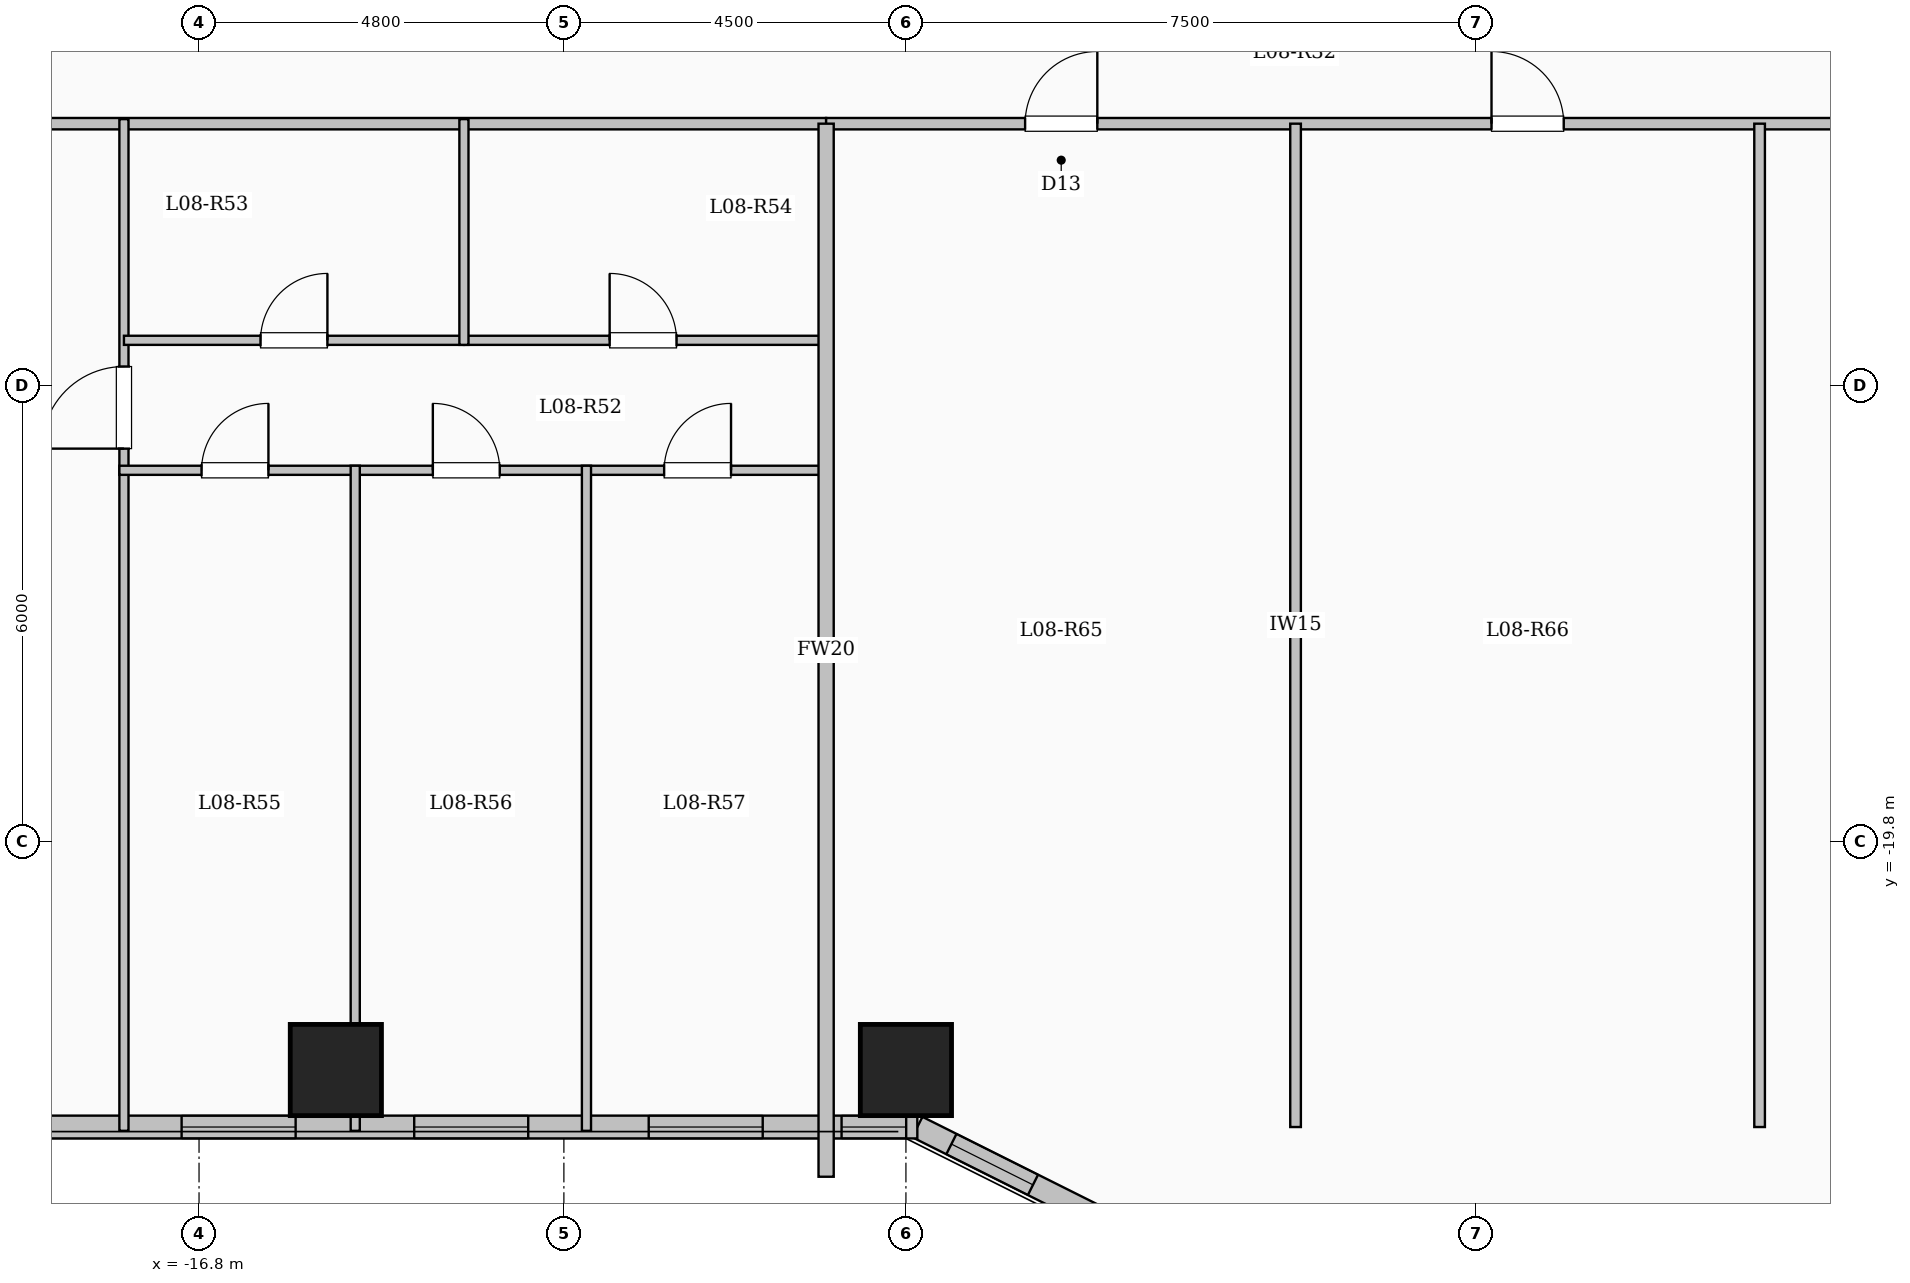
"""IFC4 building model, lengths in metres.
Left out: names, types, materials, properties, quantities, classifications, styles, units other than length and angle.
Written with IfcOpenShell. Run it as: python <this file> out.ifc"""

import sys

from ifc_helpers import new_model, si_unit, direction, frame, frame_2d, origin, origin_2d, place, context, subcontext, project, spatial, rectangle, extrude, element, fill, save


model = new_model("IFC4")
c1 = context("Model", 3, precision=1e-05, world=origin(), true_north=direction((0.0, 1.0)))
c2 = subcontext(c1, "Body", "Model", "MODEL_VIEW")
j1 = project(units=[si_unit("LENGTHUNIT", "METRE"), si_unit("PLANEANGLEUNIT", "RADIAN")], contexts=[c1])
p1 = place(None, origin())
s1 = spatial("IfcSite", under=j1, at=p1, CompositionType="ELEMENT")
p2 = place(p1, origin())
s2 = spatial("IfcBuilding", under=s1, at=p2, CompositionType="ELEMENT")
p3 = place(p2, frame((0.0, 0.0, 34.05)))
s3 = spatial("IfcBuildingStorey", under=s2, at=p3, CompositionType="ELEMENT", Elevation=34.05)
for number, where, z_axis, x_axis in (
    (1, (-15.0, -22.8, 0.0), (0.0, 0.0, 1.0), (1.0, 0.0, 0.0)),
    (2, (-7.5, -22.8, 0.0), (0.0, 0.0, 1.0), (1.0, 0.0, 0.0)),
):
    element("IfcColumn", number, at=place(p3, frame(where, z_axis=z_axis, x_axis=x_axis)), inside=s3, PredefinedType="COLUMN", context=c2, shape_type="SweptSolid", body=[
        extrude(rectangle(XDim=1.2, YDim=1.2, at=origin_2d()), origin(), (0.0, 0.0, 1.0), 3.35),
    ])
p4 = place(p3, frame((7.35, -23.55, 0.0), z_axis=(0.0, 0.0, 1.0), x_axis=(-0.894427191, -0.4472135955, 0.0)))
e3 = element("IfcWall", 3, at=p4, inside=s3, PredefinedType="SOLIDWALL", context=c2, shape_type="SweptSolid", body=[
    extrude(rectangle(XDim=3.354, YDim=0.3, at=frame_2d((1.677, 0.0))), origin(), (0.0, 0.0, 1.0), 3.1),
])
p5 = place(p4, frame((0.501, 0.0, 0.95)))
e4 = element("IfcOpeningElement", 4, at=p5, cuts=e3, PredefinedType="OPENING", context=c2, shape_type="SweptSolid", body=[
    extrude(rectangle(XDim=1.2, YDim=1.5, at=frame_2d((0.6, 0.75))), frame((0.0, 0.16, 0.0), z_axis=(0.0, -1.0, 0.0), x_axis=(1.0, 0.0, 0.0)), (0.0, 0.0, 1.0), 0.32),
])
p6 = place(p3, frame((-4.35, -25.05, 0.0), z_axis=(0.0, 0.0, 1.0), x_axis=(-0.894427191, 0.4472135955, 0.0)))
e5 = element("IfcWall", 5, at=p6, inside=s3, PredefinedType="SOLIDWALL", context=c2, shape_type="SweptSolid", body=[
    extrude(rectangle(XDim=3.354, YDim=0.3, at=frame_2d((1.677, 0.0))), origin(), (0.0, 0.0, 1.0), 3.1),
])
p7 = place(p6, frame((1.653, 0.0, 0.95)))
e6 = element("IfcOpeningElement", 6, at=p7, cuts=e5, PredefinedType="OPENING", context=c2, shape_type="SweptSolid", body=[
    extrude(rectangle(XDim=1.2, YDim=1.5, at=frame_2d((0.6, 0.75))), frame((0.0, 0.16, 0.0), z_axis=(0.0, -1.0, 0.0), x_axis=(1.0, 0.0, 0.0)), (0.0, 0.0, 1.0), 0.32),
])
p8 = place(p3, frame((-7.35, -23.55, 0.0), z_axis=(0.0, 0.0, 1.0), x_axis=(-1.0, 0.0, 0.0)))
e7 = element("IfcWall", 7, at=p8, inside=s3, PredefinedType="SOLIDWALL", context=c2, shape_type="SweptSolid", body=[
    extrude(rectangle(XDim=15.3, YDim=0.3, at=frame_2d((7.65, 0.0))), origin(), (0.0, 0.0, 1.0), 3.1),
])
p9 = place(p8, frame((0.147, 0.0, 0.95)))
e8 = element("IfcOpeningElement", 8, at=p9, cuts=e7, PredefinedType="OPENING", context=c2, shape_type="SweptSolid", body=[
    extrude(rectangle(XDim=0.85, YDim=1.5, at=frame_2d((0.425, 0.75))), frame((0.0, 0.16, 0.0), z_axis=(0.0, -1.0, 0.0), x_axis=(1.0, 0.0, 0.0)), (0.0, 0.0, 1.0), 0.32),
])
p10 = place(p8, frame((2.034, 0.0, 0.9)))
e9 = element("IfcOpeningElement", 9, at=p10, cuts=e7, PredefinedType="OPENING", context=c2, shape_type="SweptSolid", body=[
    extrude(rectangle(XDim=1.5, YDim=1.65, at=frame_2d((0.75, 0.825))), frame((0.0, 0.16, 0.0), z_axis=(0.0, -1.0, 0.0), x_axis=(1.0, 0.0, 0.0)), (0.0, 0.0, 1.0), 0.32),
])
p11 = place(p8, frame((5.119, 0.0, 0.9)))
e10 = element("IfcOpeningElement", 10, at=p11, cuts=e7, PredefinedType="OPENING", context=c2, shape_type="SweptSolid", body=[
    extrude(rectangle(XDim=1.5, YDim=1.65, at=frame_2d((0.75, 0.825))), frame((0.0, 0.16, 0.0), z_axis=(0.0, -1.0, 0.0), x_axis=(1.0, 0.0, 0.0)), (0.0, 0.0, 1.0), 0.32),
])
p12 = place(p8, frame((8.179, 0.0, 0.9)))
e11 = element("IfcOpeningElement", 11, at=p12, cuts=e7, PredefinedType="OPENING", context=c2, shape_type="SweptSolid", body=[
    extrude(rectangle(XDim=1.5, YDim=1.65, at=frame_2d((0.75, 0.825))), frame((0.0, 0.16, 0.0), z_axis=(0.0, -1.0, 0.0), x_axis=(1.0, 0.0, 0.0)), (0.0, 0.0, 1.0), 0.32),
])
p13 = place(p8, frame((11.642, 0.0, 0.9)))
e12 = element("IfcOpeningElement", 12, at=p13, cuts=e7, PredefinedType="OPENING", context=c2, shape_type="SweptSolid", body=[
    extrude(rectangle(XDim=2.4, YDim=1.8, at=frame_2d((1.2, 0.9))), frame((0.0, 0.16, 0.0), z_axis=(0.0, -1.0, 0.0), x_axis=(1.0, 0.0, 0.0)), (0.0, 0.0, 1.0), 0.32),
])
p14 = place(p3, frame((-22.55, -10.35, 0.0), z_axis=(0.0, 0.0, 1.0), x_axis=(1.0, 0.0, 0.0)))
e13 = element("IfcWall", 13, at=p14, inside=s3, PredefinedType="PARTITIONING", context=c2, shape_type="SweptSolid", body=[
    extrude(rectangle(XDim=14.0, YDim=0.15, at=frame_2d((7.0, 0.0))), origin(), (0.0, 0.0, 1.0), 3.1),
])
p15 = place(p14, frame((0.7, 0.0, 0.0)))
e14 = element("IfcOpeningElement", 14, at=p15, cuts=e13, PredefinedType="OPENING", context=c2, shape_type="SweptSolid", body=[
    extrude(rectangle(XDim=0.96, YDim=2.15, at=frame_2d((0.48, 1.075))), frame((0.0, 0.085, 0.0), z_axis=(0.0, -1.0, 0.0), x_axis=(1.0, 0.0, 0.0)), (0.0, 0.0, 1.0), 0.17),
])
p16 = place(p3, frame((-8.55, -10.35, 0.0), z_axis=(0.0, 0.0, 1.0), x_axis=(1.0, 0.0, 0.0)))
e15 = element("IfcWall", 15, at=p16, inside=s3, PredefinedType="PARTITIONING", context=c2, shape_type="SweptSolid", body=[
    extrude(rectangle(XDim=17.1, YDim=0.15, at=frame_2d((8.55, 0.0))), origin(), (0.0, 0.0, 1.0), 3.1),
])
p17 = place(p16, frame((2.618, 0.0, 0.0)))
e16 = element("IfcOpeningElement", 16, at=p17, cuts=e15, PredefinedType="OPENING", context=c2, shape_type="SweptSolid", body=[
    extrude(rectangle(XDim=0.95, YDim=2.15, at=frame_2d((0.475, 1.075))), frame((0.0, 0.085, 0.0), z_axis=(0.0, -1.0, 0.0), x_axis=(1.0, 0.0, 0.0)), (0.0, 0.0, 1.0), 0.17),
])
p18 = place(p16, frame((8.754, 0.0, 0.0)))
e17 = element("IfcOpeningElement", 17, at=p18, cuts=e15, PredefinedType="OPENING", context=c2, shape_type="SweptSolid", body=[
    extrude(rectangle(XDim=0.95, YDim=2.15, at=frame_2d((0.475, 1.075))), frame((0.0, 0.085, 0.0), z_axis=(0.0, -1.0, 0.0), x_axis=(1.0, 0.0, 0.0)), (0.0, 0.0, 1.0), 0.17),
])
p19 = place(p16, frame((14.211, 0.0, 0.0)))
e18 = element("IfcOpeningElement", 18, at=p19, cuts=e15, PredefinedType="OPENING", context=c2, shape_type="SweptSolid", body=[
    extrude(rectangle(XDim=0.95, YDim=2.15, at=frame_2d((0.475, 1.075))), frame((0.0, 0.085, 0.0), z_axis=(0.0, -1.0, 0.0), x_axis=(1.0, 0.0, 0.0)), (0.0, 0.0, 1.0), 0.17),
])
p20 = place(p3, frame((-17.788, -23.6, 0.0), z_axis=(0.0, 0.0, 1.0), x_axis=(0.0, 1.0, 0.0)))
e19 = element("IfcWall", 19, at=p20, inside=s3, PredefinedType="PARTITIONING", context=c2, shape_type="SweptSolid", body=[
    extrude(rectangle(XDim=13.31, YDim=0.12, at=frame_2d((6.655, 0.0))), origin(), (0.0, 0.0, 1.0), 3.1),
])
p21 = place(p20, frame((8.975, 0.0, 0.0)))
e20 = element("IfcOpeningElement", 20, at=p21, cuts=e19, PredefinedType="OPENING", context=c2, shape_type="SweptSolid", body=[
    extrude(rectangle(XDim=1.08, YDim=2.15, at=frame_2d((0.54, 1.075))), frame((0.0, 0.07, 0.0), z_axis=(0.0, -1.0, 0.0), x_axis=(1.0, 0.0, 0.0)), (0.0, 0.0, 1.0), 0.14),
])
p22 = place(p3, frame((-17.788, -13.2, 0.0), z_axis=(0.0, 0.0, 1.0), x_axis=(1.0, 0.0, 0.0)))
e21 = element("IfcWall", 21, at=p22, inside=s3, PredefinedType="PARTITIONING", context=c2, shape_type="SweptSolid", body=[
    extrude(rectangle(XDim=4.473, YDim=0.12, at=frame_2d((2.237, 0.0))), origin(), (0.0, 0.0, 1.0), 3.1),
])
p23 = place(p22, frame((1.797, 0.0, 0.0)))
e22 = element("IfcOpeningElement", 22, at=p23, cuts=e21, PredefinedType="OPENING", context=c2, shape_type="SweptSolid", body=[
    extrude(rectangle(XDim=0.88, YDim=2.1, at=frame_2d((0.44, 1.05))), frame((0.0, 0.07, 0.0), z_axis=(0.0, -1.0, 0.0), x_axis=(1.0, 0.0, 0.0)), (0.0, 0.0, 1.0), 0.14),
])
p24 = place(p3, frame((-13.315, -13.2, 0.0), z_axis=(0.0, 0.0, 1.0), x_axis=(1.0, 0.0, 0.0)))
e23 = element("IfcWall", 23, at=p24, inside=s3, PredefinedType="PARTITIONING", context=c2, shape_type="SweptSolid", body=[
    extrude(rectangle(XDim=4.715, YDim=0.12, at=frame_2d((2.357, 0.0))), origin(), (0.0, 0.0, 1.0), 3.1),
])
p25 = place(p24, frame((1.917, 0.0, 0.0)))
e24 = element("IfcOpeningElement", 24, at=p25, cuts=e23, PredefinedType="OPENING", context=c2, shape_type="SweptSolid", body=[
    extrude(rectangle(XDim=0.88, YDim=2.1, at=frame_2d((0.44, 1.05))), frame((0.0, 0.07, 0.0), z_axis=(0.0, -1.0, 0.0), x_axis=(1.0, 0.0, 0.0)), (0.0, 0.0, 1.0), 0.14),
])
p26 = place(p3, frame((-17.848, -14.91, 0.0), z_axis=(0.0, 0.0, 1.0), x_axis=(1.0, 0.0, 0.0)))
e25 = element("IfcWall", 25, at=p26, inside=s3, PredefinedType="PARTITIONING", context=c2, shape_type="SweptSolid", body=[
    extrude(rectangle(XDim=9.308, YDim=0.12, at=frame_2d((4.654, 0.0))), origin(), (0.0, 0.0, 1.0), 2.585),
])
p27 = place(p26, frame((1.081, 0.0, 0.0)))
e26 = element("IfcOpeningElement", 26, at=p27, cuts=e25, PredefinedType="OPENING", context=c2, shape_type="SweptSolid", body=[
    extrude(rectangle(XDim=0.88, YDim=2.1, at=frame_2d((0.44, 1.05))), frame((0.0, 0.07, 0.0), z_axis=(0.0, -1.0, 0.0), x_axis=(1.0, 0.0, 0.0)), (0.0, 0.0, 1.0), 0.14),
])
p28 = place(p26, frame((4.124, 0.0, 0.0)))
e27 = element("IfcOpeningElement", 27, at=p28, cuts=e25, PredefinedType="OPENING", context=c2, shape_type="SweptSolid", body=[
    extrude(rectangle(XDim=0.88, YDim=2.1, at=frame_2d((0.44, 1.05))), frame((0.0, 0.07, 0.0), z_axis=(0.0, -1.0, 0.0), x_axis=(1.0, 0.0, 0.0)), (0.0, 0.0, 1.0), 0.14),
])
p29 = place(p26, frame((7.167, 0.0, 0.0)))
e28 = element("IfcOpeningElement", 28, at=p29, cuts=e25, PredefinedType="OPENING", context=c2, shape_type="SweptSolid", body=[
    extrude(rectangle(XDim=0.88, YDim=2.1, at=frame_2d((0.44, 1.05))), frame((0.0, 0.07, 0.0), z_axis=(0.0, -1.0, 0.0), x_axis=(1.0, 0.0, 0.0)), (0.0, 0.0, 1.0), 0.14),
])
p30 = place(p3, frame((-13.315, -13.26, 0.0), z_axis=(0.0, 0.0, 1.0), x_axis=(0.0, 1.0, 0.0)))
e29 = element("IfcWall", 29, at=p30, inside=s3, PredefinedType="PARTITIONING", context=c2, shape_type="SweptSolid", body=[
    extrude(rectangle(XDim=2.97, YDim=0.12, at=frame_2d((1.485, 0.0))), origin(), (0.0, 0.0, 1.0), 3.1),
])
p31 = place(p3, frame((-14.745, -23.6, 0.0), z_axis=(0.0, 0.0, 1.0), x_axis=(0.0, 1.0, 0.0)))
e30 = element("IfcWall", 30, at=p31, inside=s3, PredefinedType="PARTITIONING", context=c2, shape_type="SweptSolid", body=[
    extrude(rectangle(XDim=8.75, YDim=0.12, at=frame_2d((4.375, 0.0))), origin(), (0.0, 0.0, 1.0), 2.435),
])
p32 = place(p3, frame((-11.703, -23.6, 0.0), z_axis=(0.0, 0.0, 1.0), x_axis=(0.0, 1.0, 0.0)))
e31 = element("IfcWall", 31, at=p32, inside=s3, PredefinedType="PARTITIONING", context=c2, shape_type="SweptSolid", body=[
    extrude(rectangle(XDim=8.75, YDim=0.12, at=frame_2d((4.375, 0.0))), origin(), (0.0, 0.0, 1.0), 3.1),
])
p33 = place(p3, frame((-8.55, -24.204, 0.0), z_axis=(0.0, 0.0, 1.0), x_axis=(0.0, 1.0, 0.0)))
e32 = element("IfcWall", 32, at=p33, inside=s3, PredefinedType="SOLIDWALL", context=c2, shape_type="SweptSolid", body=[
    extrude(rectangle(XDim=13.854, YDim=0.2, at=frame_2d((6.927, 0.0))), origin(), (0.0, 0.0, 1.0), 3.1),
])
for number, where, z_axis, x_axis in (
    (33, (-2.374, -23.55, 0.0), (0.0, 0.0, 1.0), (0.0, 1.0, 0.0)),
    (34, (3.731, -23.55, 0.0), (0.0, 0.0, 1.0), (0.0, 1.0, 0.0)),
):
    element("IfcWall", number, at=place(p3, frame(where, z_axis=z_axis, x_axis=x_axis)), inside=s3, PredefinedType="PARTITIONING", context=c2, shape_type="SweptSolid", body=[
        extrude(rectangle(XDim=13.2, YDim=0.14, at=frame_2d((6.6, 0.0))), origin(), (0.0, 0.0, 1.0), 3.1),
    ])
p34 = place(p7, origin())
e35 = element("IfcWindow", 35, at=p34, inside=s3, PartitioningType="SINGLE_PANEL", PredefinedType="WINDOW", context=c2, shape_type="SweptSolid", body=[
    extrude(rectangle(XDim=1.2, YDim=1.5, at=frame_2d((0.6, 0.75))), frame((0.0, 0.03, 0.0), z_axis=(0.0, -1.0, 0.0), x_axis=(1.0, 0.0, 0.0)), (0.0, 0.0, 1.0), 0.06),
])
fill(e6, e35)
p35 = place(p9, origin())
e36 = element("IfcWindow", 36, at=p35, inside=s3, PartitioningType="SINGLE_PANEL", PredefinedType="WINDOW", context=c2, shape_type="SweptSolid", body=[
    extrude(rectangle(XDim=0.85, YDim=1.5, at=frame_2d((0.425, 0.75))), frame((0.0, 0.03, 0.0), z_axis=(0.0, -1.0, 0.0), x_axis=(1.0, 0.0, 0.0)), (0.0, 0.0, 1.0), 0.06),
])
fill(e8, e36)
p36 = place(p10, origin())
e37 = element("IfcWindow", 37, at=p36, inside=s3, PartitioningType="SINGLE_PANEL", PredefinedType="WINDOW", context=c2, shape_type="SweptSolid", body=[
    extrude(rectangle(XDim=1.5, YDim=1.65, at=frame_2d((0.75, 0.825))), frame((0.0, 0.03, 0.0), z_axis=(0.0, -1.0, 0.0), x_axis=(1.0, 0.0, 0.0)), (0.0, 0.0, 1.0), 0.06),
])
fill(e9, e37)
p37 = place(p11, origin())
e38 = element("IfcWindow", 38, at=p37, inside=s3, PartitioningType="SINGLE_PANEL", PredefinedType="WINDOW", context=c2, shape_type="SweptSolid", body=[
    extrude(rectangle(XDim=1.5, YDim=1.65, at=frame_2d((0.75, 0.825))), frame((0.0, 0.03, 0.0), z_axis=(0.0, -1.0, 0.0), x_axis=(1.0, 0.0, 0.0)), (0.0, 0.0, 1.0), 0.06),
])
fill(e10, e38)
p38 = place(p12, origin())
e39 = element("IfcWindow", 39, at=p38, inside=s3, PartitioningType="SINGLE_PANEL", PredefinedType="WINDOW", context=c2, shape_type="SweptSolid", body=[
    extrude(rectangle(XDim=1.5, YDim=1.65, at=frame_2d((0.75, 0.825))), frame((0.0, 0.03, 0.0), z_axis=(0.0, -1.0, 0.0), x_axis=(1.0, 0.0, 0.0)), (0.0, 0.0, 1.0), 0.06),
])
fill(e11, e39)
p39 = place(p21, origin())
e40 = element("IfcDoor", 40, at=p39, inside=s3, OperationType="SINGLE_SWING_LEFT", PredefinedType="DOOR", context=c2, shape_type="SweptSolid", body=[
    extrude(rectangle(XDim=1.08, YDim=2.15, at=frame_2d((0.54, 1.075))), frame((0.0, 0.025, 0.0), z_axis=(0.0, -1.0, 0.0), x_axis=(1.0, 0.0, 0.0)), (0.0, 0.0, 1.0), 0.05),
])
fill(e20, e40)
p40 = place(p23, origin())
e41 = element("IfcDoor", 41, at=p40, inside=s3, OperationType="SINGLE_SWING_RIGHT", PredefinedType="DOOR", context=c2, shape_type="SweptSolid", body=[
    extrude(rectangle(XDim=0.88, YDim=2.1, at=frame_2d((0.44, 1.05))), frame((0.0, 0.025, 0.0), z_axis=(0.0, -1.0, 0.0), x_axis=(1.0, 0.0, 0.0)), (0.0, 0.0, 1.0), 0.05),
])
fill(e22, e41)
p41 = place(p25, origin())
e42 = element("IfcDoor", 42, at=p41, inside=s3, OperationType="SINGLE_SWING_LEFT", PredefinedType="DOOR", context=c2, shape_type="SweptSolid", body=[
    extrude(rectangle(XDim=0.88, YDim=2.1, at=frame_2d((0.44, 1.05))), frame((0.0, 0.025, 0.0), z_axis=(0.0, -1.0, 0.0), x_axis=(1.0, 0.0, 0.0)), (0.0, 0.0, 1.0), 0.05),
])
fill(e24, e42)
p42 = place(p27, origin())
e43 = element("IfcDoor", 43, at=p42, inside=s3, OperationType="SINGLE_SWING_RIGHT", PredefinedType="DOOR", context=c2, shape_type="SweptSolid", body=[
    extrude(rectangle(XDim=0.88, YDim=2.1, at=frame_2d((0.44, 1.05))), frame((0.0, 0.025, 0.0), z_axis=(0.0, -1.0, 0.0), x_axis=(1.0, 0.0, 0.0)), (0.0, 0.0, 1.0), 0.05),
])
fill(e26, e43)
p43 = place(p28, origin())
e44 = element("IfcDoor", 44, at=p43, inside=s3, OperationType="SINGLE_SWING_LEFT", PredefinedType="DOOR", context=c2, shape_type="SweptSolid", body=[
    extrude(rectangle(XDim=0.88, YDim=2.1, at=frame_2d((0.44, 1.05))), frame((0.0, 0.025, 0.0), z_axis=(0.0, -1.0, 0.0), x_axis=(1.0, 0.0, 0.0)), (0.0, 0.0, 1.0), 0.05),
])
fill(e27, e44)
p44 = place(p29, origin())
e45 = element("IfcDoor", 45, at=p44, inside=s3, OperationType="SINGLE_SWING_RIGHT", PredefinedType="DOOR", context=c2, shape_type="SweptSolid", body=[
    extrude(rectangle(XDim=0.88, YDim=2.1, at=frame_2d((0.44, 1.05))), frame((0.0, 0.025, 0.0), z_axis=(0.0, -1.0, 0.0), x_axis=(1.0, 0.0, 0.0)), (0.0, 0.0, 1.0), 0.05),
])
fill(e28, e45)
p45 = place(p17, origin())
e46 = element("IfcDoor", 46, at=p45, inside=s3, OperationType="SINGLE_SWING_RIGHT", PredefinedType="DOOR", context=c2, shape_type="SweptSolid", body=[
    extrude(rectangle(XDim=0.95, YDim=2.15, at=frame_2d((0.475, 1.075))), frame((0.0, 0.025, 0.0), z_axis=(0.0, -1.0, 0.0), x_axis=(1.0, 0.0, 0.0)), (0.0, 0.0, 1.0), 0.05),
])
fill(e16, e46)
p46 = place(p18, origin())
e47 = element("IfcDoor", 47, at=p46, inside=s3, OperationType="SINGLE_SWING_LEFT", PredefinedType="DOOR", context=c2, shape_type="SweptSolid", body=[
    extrude(rectangle(XDim=0.95, YDim=2.15, at=frame_2d((0.475, 1.075))), frame((0.0, 0.025, 0.0), z_axis=(0.0, -1.0, 0.0), x_axis=(1.0, 0.0, 0.0)), (0.0, 0.0, 1.0), 0.05),
])
fill(e17, e47)
save(model, sys.argv[1])
